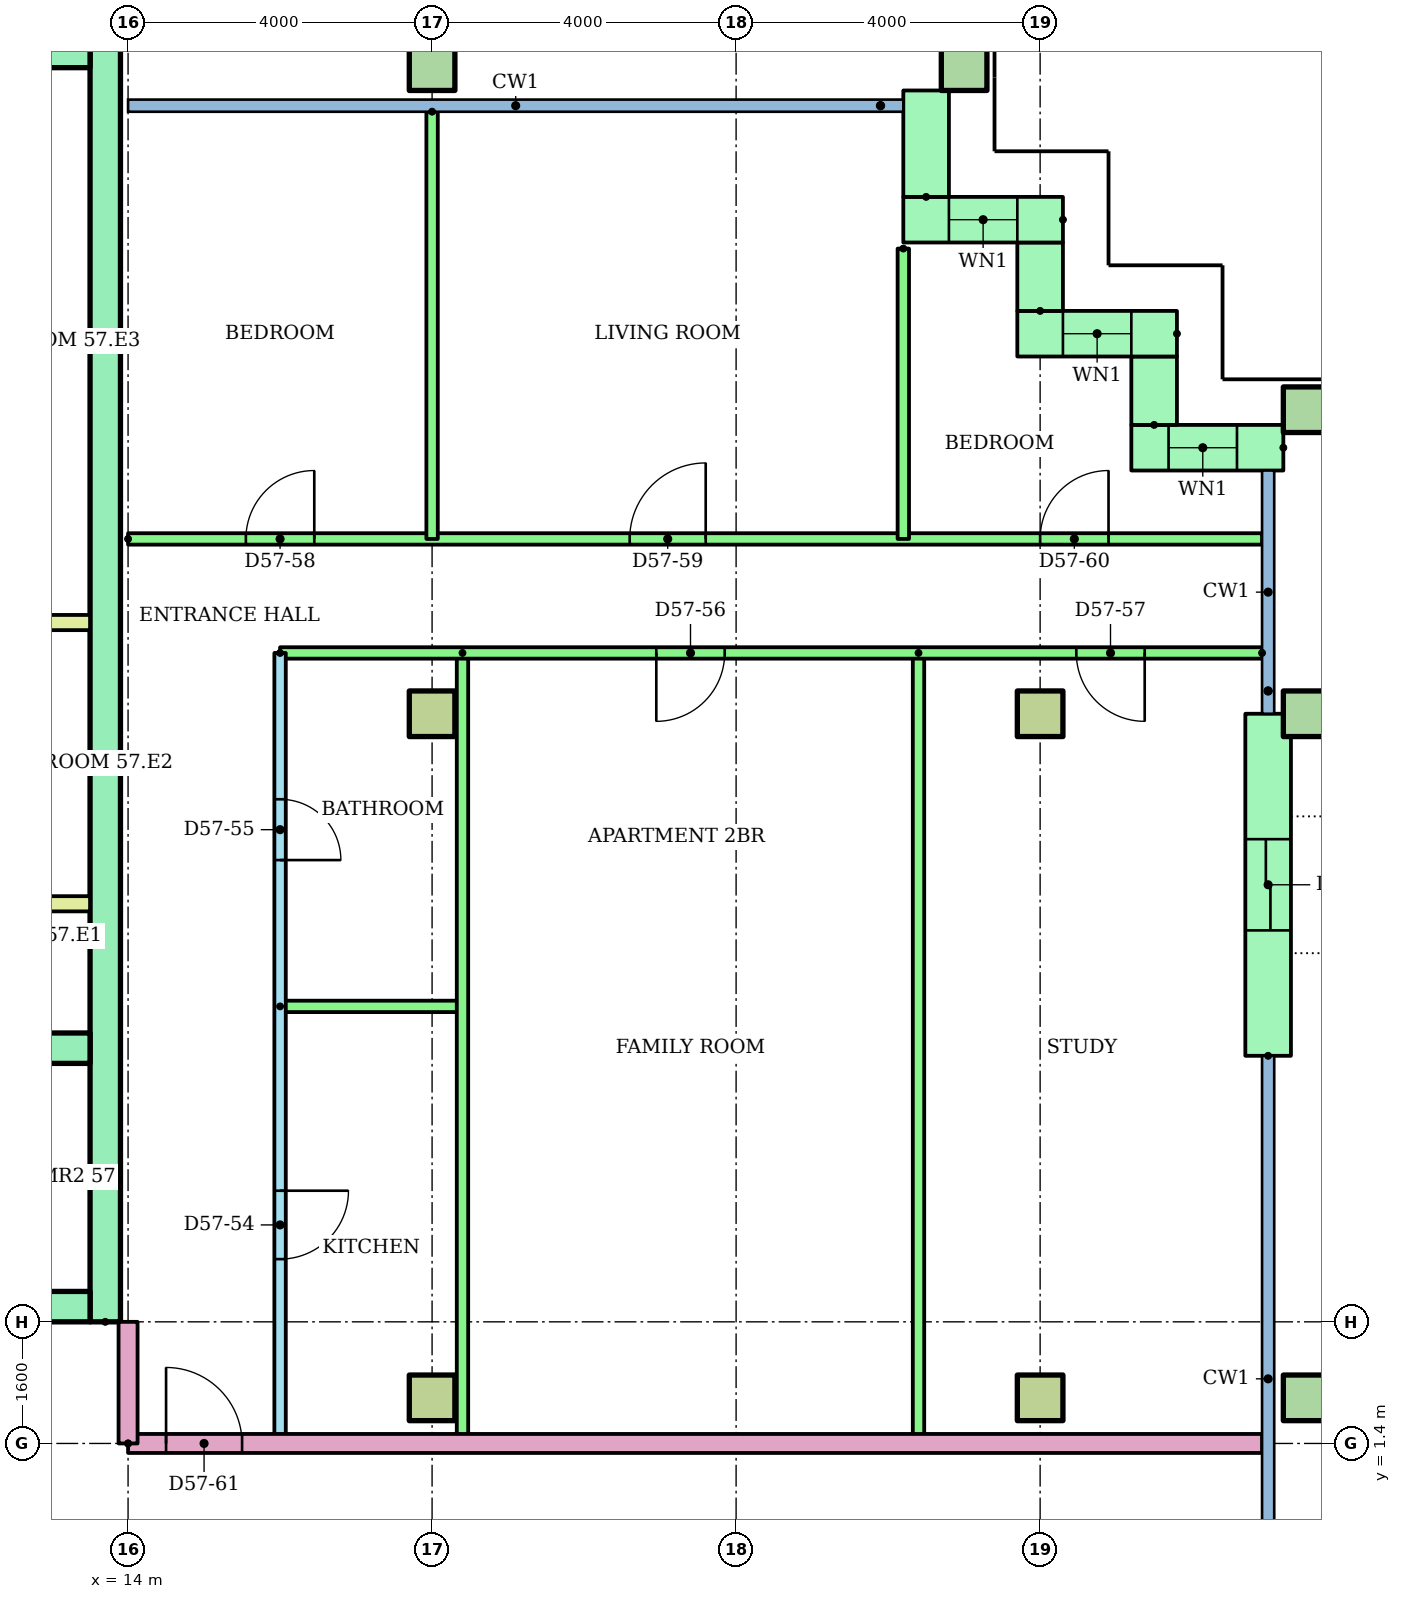
"""IFC4 building model, lengths in metres.
Left out: names, types, materials, properties, quantities, classifications, styles, units other than length and angle.
Written with IfcOpenShell. Run it as: python <this file> out.ifc"""

import sys

from ifc_helpers import new_model, si_unit, direction, frame, frame_2d, origin, origin_2d, place, context, subcontext, project, spatial, rectangle, hollow_rectangle, extrude, element, fill, save


model = new_model("IFC4")
c1 = context("Model", 3, precision=1e-05, world=origin(), true_north=direction((0.0, 1.0)))
c2 = subcontext(c1, "Body", "Model", "MODEL_VIEW")
j1 = project(units=[si_unit("LENGTHUNIT", "METRE"), si_unit("PLANEANGLEUNIT", "RADIAN")], contexts=[c1])
p1 = place(None, origin())
s1 = spatial("IfcSite", under=j1, at=p1, CompositionType="ELEMENT")
p2 = place(p1, origin())
s2 = spatial("IfcBuilding", under=s1, at=p2, CompositionType="ELEMENT")
p3 = place(p2, frame((0.0, 0.0, 220.4)))
s3 = spatial("IfcBuildingStorey", under=s2, at=p3, CompositionType="ELEMENT", Elevation=220.4)
for number, where in (
    (1, (18.0, 2.0, 0.0)),
    (2, (26.0, 2.0, 0.0)),
):
    element("IfcColumn", number, at=place(p3, frame(where)), inside=s3, PredefinedType="COLUMN", context=c2, shape_type="SweptSolid", body=[
        extrude(rectangle(XDim=0.6, YDim=0.6, at=origin_2d()), origin(), (0.0, 0.0, 1.0), 3.2),
    ])
p4 = place(p3, frame((29.5, 2.0, 0.0)))
e3 = element("IfcColumn", 3, at=p4, inside=s3, PredefinedType="COLUMN", context=c2, shape_type="SweptSolid", body=[
    extrude(hollow_rectangle(XDim=0.6, YDim=0.6, WallThickness=0.03, at=origin_2d()), origin(), (0.0, 0.0, 1.0), 3.2),
])
for number, where in (
    (4, (18.0, 11.0, 0.0)),
    (5, (26.0, 11.0, 0.0)),
):
    element("IfcColumn", number, at=place(p3, frame(where)), inside=s3, PredefinedType="COLUMN", context=c2, shape_type="SweptSolid", body=[
        extrude(rectangle(XDim=0.6, YDim=0.6, at=origin_2d()), origin(), (0.0, 0.0, 1.0), 3.2),
    ])
for number, where in (
    (6, (29.5, 11.0, 0.0)),
    (7, (29.5, 15.0, 0.0)),
    (8, (18.0, 19.5, 0.0)),
    (9, (25.0, 19.5, 0.0)),
):
    element("IfcColumn", number, at=place(p3, frame(where)), inside=s3, PredefinedType="COLUMN", context=c2, shape_type="SweptSolid", body=[
        extrude(hollow_rectangle(XDim=0.6, YDim=0.6, WallThickness=0.03, at=origin_2d()), origin(), (0.0, 0.0, 1.0), 3.2),
    ])
p5 = place(p3, frame((29.2, 14.5, 0.0), z_axis=(0.0, 0.0, 1.0), x_axis=(-1.0, 0.0, 0.0)))
e10 = element("IfcWall", 10, at=p5, inside=s3, PredefinedType="STANDARD", context=c2, shape_type="SweptSolid", body=[
    extrude(rectangle(XDim=2.0, YDim=0.6, at=frame_2d((1.0, 0.0))), origin(), (0.0, 0.0, 1.0), 2.92),
])
p6 = place(p5, frame((0.61, 0.0, 0.9)))
e11 = element("IfcOpeningElement", 11, at=p6, cuts=e10, PredefinedType="OPENING", context=c2, shape_type="SweptSolid", body=[
    extrude(rectangle(XDim=0.9, YDim=1.5, at=frame_2d((0.45, 0.75))), frame((0.0, 0.31, 0.0), z_axis=(0.0, -1.0, 0.0), x_axis=(1.0, 0.0, 0.0)), (0.0, 0.0, 1.0), 0.62),
])
p7 = place(p3, frame((27.5, 14.8, 0.0), z_axis=(0.0, 0.0, 1.0), x_axis=(0.0, 1.0, 0.0)))
e12 = element("IfcWall", 12, at=p7, inside=s3, PredefinedType="STANDARD", context=c2, shape_type="SweptSolid", body=[
    extrude(rectangle(XDim=0.9, YDim=0.6, at=frame_2d((0.45, 0.0))), origin(), (0.0, 0.0, 1.0), 2.92),
])
p8 = place(p3, frame((27.8, 16.0, 0.0), z_axis=(0.0, 0.0, 1.0), x_axis=(-1.0, 0.0, 0.0)))
e13 = element("IfcWall", 13, at=p8, inside=s3, PredefinedType="STANDARD", context=c2, shape_type="SweptSolid", body=[
    extrude(rectangle(XDim=2.1, YDim=0.6, at=frame_2d((1.05, 0.0))), origin(), (0.0, 0.0, 1.0), 2.92),
])
p9 = place(p8, frame((0.6, 0.0, 0.9)))
e14 = element("IfcOpeningElement", 14, at=p9, cuts=e13, PredefinedType="OPENING", context=c2, shape_type="SweptSolid", body=[
    extrude(rectangle(XDim=0.9, YDim=1.5, at=frame_2d((0.45, 0.75))), frame((0.0, 0.31, 0.0), z_axis=(0.0, -1.0, 0.0), x_axis=(1.0, 0.0, 0.0)), (0.0, 0.0, 1.0), 0.62),
])
p10 = place(p3, frame((26.0, 16.3, 0.0), z_axis=(0.0, 0.0, 1.0), x_axis=(0.0, 1.0, 0.0)))
e15 = element("IfcWall", 15, at=p10, inside=s3, PredefinedType="STANDARD", context=c2, shape_type="SweptSolid", body=[
    extrude(rectangle(XDim=0.9, YDim=0.6, at=frame_2d((0.45, 0.0))), origin(), (0.0, 0.0, 1.0), 2.92),
])
p11 = place(p3, frame((26.3, 17.5, 0.0), z_axis=(0.0, 0.0, 1.0), x_axis=(-1.0, 0.0, 0.0)))
e16 = element("IfcWall", 16, at=p11, inside=s3, PredefinedType="STANDARD", context=c2, shape_type="SweptSolid", body=[
    extrude(rectangle(XDim=2.1, YDim=0.6, at=frame_2d((1.05, 0.0))), origin(), (0.0, 0.0, 1.0), 2.92),
])
p12 = place(p11, frame((0.6, 0.0, 0.9)))
e17 = element("IfcOpeningElement", 17, at=p12, cuts=e16, PredefinedType="OPENING", context=c2, shape_type="SweptSolid", body=[
    extrude(rectangle(XDim=0.9, YDim=1.5, at=frame_2d((0.45, 0.75))), frame((0.0, 0.31, 0.0), z_axis=(0.0, -1.0, 0.0), x_axis=(1.0, 0.0, 0.0)), (0.0, 0.0, 1.0), 0.62),
])
p13 = place(p3, frame((24.5, 17.8, 0.0), z_axis=(0.0, 0.0, 1.0), x_axis=(0.0, 1.0, 0.0)))
e18 = element("IfcWall", 18, at=p13, inside=s3, PredefinedType="STANDARD", context=c2, shape_type="SweptSolid", body=[
    extrude(rectangle(XDim=1.4, YDim=0.6, at=frame_2d((0.7, 0.0))), origin(), (0.0, 0.0, 1.0), 2.92),
])
p14 = place(p3, frame((29.0, 6.5, 0.0), z_axis=(0.0, 0.0, 1.0), x_axis=(0.0, 1.0, 0.0)))
e19 = element("IfcWall", 19, at=p14, inside=s3, PredefinedType="STANDARD", context=c2, shape_type="SweptSolid", body=[
    extrude(rectangle(XDim=4.5, YDim=0.6, at=frame_2d((2.25, 0.0))), origin(), (0.0, 0.0, 1.0), 2.92),
])
p15 = place(p14, frame((1.65, 0.0, 0.0)))
e20 = element("IfcOpeningElement", 20, at=p15, cuts=e19, PredefinedType="OPENING", context=c2, shape_type="SweptSolid", body=[
    extrude(rectangle(XDim=1.2, YDim=2.1, at=frame_2d((0.6, 1.05))), frame((0.0, 0.31, 0.0), z_axis=(0.0, -1.0, 0.0), x_axis=(1.0, 0.0, 0.0)), (0.0, 0.0, 1.0), 0.62),
])
p16 = place(p3, frame((13.7, 3.0, 0.0), z_axis=(0.0, 0.0, 1.0), x_axis=(0.0, 1.0, 0.0)))
e21 = element("IfcWall", 21, at=p16, inside=s3, PredefinedType="SHEAR", context=c2, shape_type="SweptSolid", body=[
    extrude(rectangle(XDim=17.0, YDim=0.4, at=frame_2d((8.5, 0.0))), origin(), (0.0, 0.0, 1.0), 2.92),
])
p17 = place(p3, frame((-13.5, 19.7, 0.0)))
e22 = element("IfcWall", 22, at=p17, inside=s3, PredefinedType="SHEAR", context=c2, shape_type="SweptSolid", body=[
    extrude(rectangle(XDim=27.0, YDim=0.4, at=frame_2d((13.5, 0.0))), origin(), (0.0, 0.0, 1.0), 2.92),
])
p18 = place(p3, frame((-13.5, 3.2, 0.0)))
e23 = element("IfcWall", 23, at=p18, inside=s3, PredefinedType="SHEAR", context=c2, shape_type="SweptSolid", body=[
    extrude(rectangle(XDim=27.0, YDim=0.4, at=frame_2d((13.5, 0.0))), origin(), (0.0, 0.0, 1.0), 2.92),
])
p19 = place(p18, frame((22.083, 0.0, 0.0)))
e24 = element("IfcOpeningElement", 24, at=p19, cuts=e23, PredefinedType="OPENING", context=c2, shape_type="SweptSolid", body=[
    extrude(rectangle(XDim=1.1, YDim=2.1, at=frame_2d((0.55, 1.05))), frame((0.0, 0.21, 0.0), z_axis=(0.0, -1.0, 0.0), x_axis=(1.0, 0.0, 0.0)), (0.0, 0.0, 1.0), 0.42),
])
p20 = place(p18, frame((25.128, 0.0, 0.0)))
e25 = element("IfcOpeningElement", 25, at=p20, cuts=e23, PredefinedType="OPENING", context=c2, shape_type="SweptSolid", body=[
    extrude(rectangle(XDim=1.1, YDim=2.1, at=frame_2d((0.55, 1.05))), frame((0.0, 0.21, 0.0), z_axis=(0.0, -1.0, 0.0), x_axis=(1.0, 0.0, 0.0)), (0.0, 0.0, 1.0), 0.42),
])
p21 = place(p18, frame((12.6, 0.0, 0.0)))
e26 = element("IfcOpeningElement", 26, at=p21, cuts=e23, PredefinedType="OPENING", context=c2, shape_type="SweptSolid", body=[
    extrude(rectangle(XDim=1.8, YDim=2.1, at=frame_2d((0.9, 1.05))), frame((0.0, 0.21, 0.0), z_axis=(0.0, -1.0, 0.0), x_axis=(1.0, 0.0, 0.0)), (0.0, 0.0, 1.0), 0.42),
])
p22 = place(p3, frame((1.522, 6.6, 0.0)))
e27 = element("IfcWall", 27, at=p22, inside=s3, PredefinedType="SHEAR", context=c2, shape_type="SweptSolid", body=[
    extrude(rectangle(XDim=11.978, YDim=0.4, at=frame_2d((5.989, 0.0))), origin(), (0.0, 0.0, 1.0), 2.92),
])
p23 = place(p22, frame((1.022, 0.0, 0.0)))
e28 = element("IfcOpeningElement", 28, at=p23, cuts=e27, PredefinedType="OPENING", context=c2, shape_type="SweptSolid", body=[
    extrude(rectangle(XDim=1.0, YDim=2.1, at=frame_2d((0.5, 1.05))), frame((0.0, 0.21, 0.0), z_axis=(0.0, -1.0, 0.0), x_axis=(1.0, 0.0, 0.0)), (0.0, 0.0, 1.0), 0.42),
])
p24 = place(p22, frame((4.067, 0.0, 0.0)))
e29 = element("IfcOpeningElement", 29, at=p24, cuts=e27, PredefinedType="OPENING", context=c2, shape_type="SweptSolid", body=[
    extrude(rectangle(XDim=1.0, YDim=2.1, at=frame_2d((0.5, 1.05))), frame((0.0, 0.21, 0.0), z_axis=(0.0, -1.0, 0.0), x_axis=(1.0, 0.0, 0.0)), (0.0, 0.0, 1.0), 0.42),
])
for number, where in (
    (30, (9.6, 8.5, 0.0)),
    (31, (9.6, 12.2, 0.0)),
):
    element("IfcWall", number, at=place(p3, frame(where)), inside=s3, PredefinedType="PARTITIONING", context=c2, shape_type="SweptSolid", body=[
        extrude(rectangle(XDim=3.9, YDim=0.2, at=frame_2d((1.95, 0.0))), origin(), (0.0, 0.0, 1.0), 2.92),
    ])
p25 = place(p3, frame((16.0, 11.8, 0.0), z_axis=(0.0, 0.0, 1.0), x_axis=(0.0, -1.0, 0.0)))
e32 = element("IfcWall", 32, at=p25, inside=s3, PredefinedType="PARTITIONING", context=c2, shape_type="SweptSolid", body=[
    extrude(rectangle(XDim=10.4, YDim=0.15, at=frame_2d((5.2, 0.0))), origin(), (0.0, 0.0, 1.0), 2.4),
])
p26 = place(p25, frame((7.075, 0.0, 0.0)))
e33 = element("IfcOpeningElement", 33, at=p26, cuts=e32, PredefinedType="OPENING", context=c2, shape_type="SweptSolid", body=[
    extrude(rectangle(XDim=0.9, YDim=2.1, at=frame_2d((0.45, 1.05))), frame((0.0, 0.085, 0.0), z_axis=(0.0, -1.0, 0.0), x_axis=(1.0, 0.0, 0.0)), (0.0, 0.0, 1.0), 0.17),
])
p27 = place(p25, frame((1.925, 0.0, 0.0)))
e34 = element("IfcOpeningElement", 34, at=p27, cuts=e32, PredefinedType="OPENING", context=c2, shape_type="SweptSolid", body=[
    extrude(rectangle(XDim=0.8, YDim=2.1, at=frame_2d((0.4, 1.05))), frame((0.0, 0.085, 0.0), z_axis=(0.0, -1.0, 0.0), x_axis=(1.0, 0.0, 0.0)), (0.0, 0.0, 1.0), 0.17),
])
p28 = place(p3, frame((16.0, 7.15, 0.0)))
e35 = element("IfcWall", 35, at=p28, inside=s3, PredefinedType="PARTITIONING", context=c2, shape_type="SweptSolid", body=[
    extrude(rectangle(XDim=2.4, YDim=0.15, at=frame_2d((1.2, 0.0))), origin(), (0.0, 0.0, 1.0), 2.4),
])
for number, where, z_axis, x_axis in (
    (36, (18.4, 11.8, 0.0), (0.0, 0.0, 1.0), (0.0, -1.0, 0.0)),
    (37, (24.4, 11.8, 0.0), (0.0, 0.0, 1.0), (0.0, -1.0, 0.0)),
):
    element("IfcWall", number, at=place(p3, frame(where, z_axis=z_axis, x_axis=x_axis)), inside=s3, PredefinedType="PARTITIONING", context=c2, shape_type="SweptSolid", body=[
        extrude(rectangle(XDim=10.4, YDim=0.15, at=frame_2d((5.2, 0.0))), origin(), (0.0, 0.0, 1.0), 2.4),
    ])
p29 = place(p3, frame((28.92, 11.8, 0.0), z_axis=(0.0, 0.0, 1.0), x_axis=(-1.0, 0.0, 0.0)))
e38 = element("IfcWall", 38, at=p29, inside=s3, PredefinedType="PARTITIONING", context=c2, shape_type="SweptSolid", body=[
    extrude(rectangle(XDim=12.92, YDim=0.15, at=frame_2d((6.46, 0.0))), origin(), (0.0, 0.0, 1.0), 2.4),
])
p30 = place(p29, frame((7.07, 0.0, 0.0)))
e39 = element("IfcOpeningElement", 39, at=p30, cuts=e38, PredefinedType="OPENING", context=c2, shape_type="SweptSolid", body=[
    extrude(rectangle(XDim=0.9, YDim=2.1, at=frame_2d((0.45, 1.05))), frame((0.0, 0.085, 0.0), z_axis=(0.0, -1.0, 0.0), x_axis=(1.0, 0.0, 0.0)), (0.0, 0.0, 1.0), 0.17),
])
p31 = place(p29, frame((1.544, 0.0, 0.0)))
e40 = element("IfcOpeningElement", 40, at=p31, cuts=e38, PredefinedType="OPENING", context=c2, shape_type="SweptSolid", body=[
    extrude(rectangle(XDim=0.9, YDim=2.1, at=frame_2d((0.45, 1.05))), frame((0.0, 0.085, 0.0), z_axis=(0.0, -1.0, 0.0), x_axis=(1.0, 0.0, 0.0)), (0.0, 0.0, 1.0), 0.17),
])
p32 = place(p3, frame((14.0, 13.3, 0.0)))
e41 = element("IfcWall", 41, at=p32, inside=s3, PredefinedType="PARTITIONING", context=c2, shape_type="SweptSolid", body=[
    extrude(rectangle(XDim=14.92, YDim=0.15, at=frame_2d((7.46, 0.0))), origin(), (0.0, 0.0, 1.0), 2.4),
])
p33 = place(p32, frame((1.55, 0.0, 0.0)))
e42 = element("IfcOpeningElement", 42, at=p33, cuts=e41, PredefinedType="OPENING", context=c2, shape_type="SweptSolid", body=[
    extrude(rectangle(XDim=0.9, YDim=2.1, at=frame_2d((0.45, 1.05))), frame((0.0, 0.085, 0.0), z_axis=(0.0, -1.0, 0.0), x_axis=(1.0, 0.0, 0.0)), (0.0, 0.0, 1.0), 0.17),
])
p34 = place(p32, frame((6.6, 0.0, 0.0)))
e43 = element("IfcOpeningElement", 43, at=p34, cuts=e41, PredefinedType="OPENING", context=c2, shape_type="SweptSolid", body=[
    extrude(rectangle(XDim=1.0, YDim=2.1, at=frame_2d((0.5, 1.05))), frame((0.0, 0.085, 0.0), z_axis=(0.0, -1.0, 0.0), x_axis=(1.0, 0.0, 0.0)), (0.0, 0.0, 1.0), 0.17),
])
p35 = place(p32, frame((12.0, 0.0, 0.0)))
e44 = element("IfcOpeningElement", 44, at=p35, cuts=e41, PredefinedType="OPENING", context=c2, shape_type="SweptSolid", body=[
    extrude(rectangle(XDim=0.9, YDim=2.1, at=frame_2d((0.45, 1.05))), frame((0.0, 0.085, 0.0), z_axis=(0.0, -1.0, 0.0), x_axis=(1.0, 0.0, 0.0)), (0.0, 0.0, 1.0), 0.17),
])
p36 = place(p3, frame((18.0, 18.921, 0.0), z_axis=(0.0, 0.0, 1.0), x_axis=(0.0, -1.0, 0.0)))
e45 = element("IfcWall", 45, at=p36, inside=s3, PredefinedType="PARTITIONING", context=c2, shape_type="SweptSolid", body=[
    extrude(rectangle(XDim=5.621, YDim=0.15, at=frame_2d((2.811, 0.0))), origin(), (0.0, 0.0, 1.0), 2.4),
])
p37 = place(p3, frame((24.2, 17.12, 0.0), z_axis=(0.0, 0.0, 1.0), x_axis=(0.0, -1.0, 0.0)))
e46 = element("IfcWall", 46, at=p37, inside=s3, PredefinedType="PARTITIONING", context=c2, shape_type="SweptSolid", body=[
    extrude(rectangle(XDim=3.82, YDim=0.15, at=frame_2d((1.91, 0.0))), origin(), (0.0, 0.0, 1.0), 2.4),
])
p38 = place(p3, frame((14.0, 1.4, 0.0)))
e47 = element("IfcWall", 47, at=p38, inside=s3, PredefinedType="PARTITIONING", context=c2, shape_type="SweptSolid", body=[
    extrude(rectangle(XDim=14.92, YDim=0.25, at=frame_2d((7.46, 0.0))), origin(), (0.0, 0.0, 1.0), 2.4),
])
p39 = place(p38, frame((0.5, 0.0, 0.0)))
e48 = element("IfcOpeningElement", 48, at=p39, cuts=e47, PredefinedType="OPENING", context=c2, shape_type="SweptSolid", body=[
    extrude(rectangle(XDim=1.0, YDim=2.1, at=frame_2d((0.5, 1.05))), frame((0.0, 0.135, 0.0), z_axis=(0.0, -1.0, 0.0), x_axis=(1.0, 0.0, 0.0)), (0.0, 0.0, 1.0), 0.27),
])
p40 = place(p3, frame((14.0, 1.4, 0.0), z_axis=(0.0, 0.0, 1.0), x_axis=(0.0, 1.0, 0.0)))
e49 = element("IfcWall", 49, at=p40, inside=s3, PredefinedType="PARTITIONING", context=c2, shape_type="SweptSolid", body=[
    extrude(rectangle(XDim=1.6, YDim=0.25, at=frame_2d((0.8, 0.0))), origin(), (0.0, 0.0, 1.0), 2.4),
])
p41 = place(p6, origin())
e50 = element("IfcWindow", 50, at=p41, inside=s3, PartitioningType="SINGLE_PANEL", PredefinedType="WINDOW", context=c2, shape_type="SweptSolid", body=[
    extrude(rectangle(XDim=0.9, YDim=1.5, at=frame_2d((0.45, 0.75))), frame((0.0, 0.03, 0.0), z_axis=(0.0, -1.0, 0.0), x_axis=(1.0, 0.0, 0.0)), (0.0, 0.0, 1.0), 0.06),
])
fill(e11, e50)
p42 = place(p9, origin())
e51 = element("IfcWindow", 51, at=p42, inside=s3, PartitioningType="SINGLE_PANEL", PredefinedType="WINDOW", context=c2, shape_type="SweptSolid", body=[
    extrude(rectangle(XDim=0.9, YDim=1.5, at=frame_2d((0.45, 0.75))), frame((0.0, 0.03, 0.0), z_axis=(0.0, -1.0, 0.0), x_axis=(1.0, 0.0, 0.0)), (0.0, 0.0, 1.0), 0.06),
])
fill(e14, e51)
p43 = place(p12, origin())
e52 = element("IfcWindow", 52, at=p43, inside=s3, PartitioningType="SINGLE_PANEL", PredefinedType="WINDOW", context=c2, shape_type="SweptSolid", body=[
    extrude(rectangle(XDim=0.9, YDim=1.5, at=frame_2d((0.45, 0.75))), frame((0.0, 0.03, 0.0), z_axis=(0.0, -1.0, 0.0), x_axis=(1.0, 0.0, 0.0)), (0.0, 0.0, 1.0), 0.06),
])
fill(e17, e52)
p44 = place(p26, origin())
e53 = element("IfcDoor", 53, at=p44, inside=s3, OperationType="SINGLE_SWING_LEFT", PredefinedType="DOOR", context=c2, shape_type="SweptSolid", body=[
    extrude(rectangle(XDim=0.9, YDim=2.1, at=frame_2d((0.45, 1.05))), frame((0.0, 0.025, 0.0), z_axis=(0.0, -1.0, 0.0), x_axis=(1.0, 0.0, 0.0)), (0.0, 0.0, 1.0), 0.05),
])
fill(e33, e53)
p45 = place(p27, origin())
e54 = element("IfcDoor", 54, at=p45, inside=s3, OperationType="SINGLE_SWING_RIGHT", PredefinedType="DOOR", context=c2, shape_type="SweptSolid", body=[
    extrude(rectangle(XDim=0.8, YDim=2.1, at=frame_2d((0.4, 1.05))), frame((0.0, 0.025, 0.0), z_axis=(0.0, -1.0, 0.0), x_axis=(1.0, 0.0, 0.0)), (0.0, 0.0, 1.0), 0.05),
])
fill(e34, e54)
p46 = place(p30, origin())
e55 = element("IfcDoor", 55, at=p46, inside=s3, OperationType="SINGLE_SWING_RIGHT", PredefinedType="DOOR", context=c2, shape_type="SweptSolid", body=[
    extrude(rectangle(XDim=0.9, YDim=2.1, at=frame_2d((0.45, 1.05))), frame((0.0, 0.025, 0.0), z_axis=(0.0, -1.0, 0.0), x_axis=(1.0, 0.0, 0.0)), (0.0, 0.0, 1.0), 0.05),
])
fill(e39, e55)
p47 = place(p31, origin())
e56 = element("IfcDoor", 56, at=p47, inside=s3, OperationType="SINGLE_SWING_LEFT", PredefinedType="DOOR", context=c2, shape_type="SweptSolid", body=[
    extrude(rectangle(XDim=0.9, YDim=2.1, at=frame_2d((0.45, 1.05))), frame((0.0, 0.025, 0.0), z_axis=(0.0, -1.0, 0.0), x_axis=(1.0, 0.0, 0.0)), (0.0, 0.0, 1.0), 0.05),
])
fill(e40, e56)
p48 = place(p33, origin())
e57 = element("IfcDoor", 57, at=p48, inside=s3, OperationType="SINGLE_SWING_RIGHT", PredefinedType="DOOR", context=c2, shape_type="SweptSolid", body=[
    extrude(rectangle(XDim=0.9, YDim=2.1, at=frame_2d((0.45, 1.05))), frame((0.0, 0.025, 0.0), z_axis=(0.0, -1.0, 0.0), x_axis=(1.0, 0.0, 0.0)), (0.0, 0.0, 1.0), 0.05),
])
fill(e42, e57)
p49 = place(p34, origin())
e58 = element("IfcDoor", 58, at=p49, inside=s3, OperationType="SINGLE_SWING_RIGHT", PredefinedType="DOOR", context=c2, shape_type="SweptSolid", body=[
    extrude(rectangle(XDim=1.0, YDim=2.1, at=frame_2d((0.5, 1.05))), frame((0.0, 0.025, 0.0), z_axis=(0.0, -1.0, 0.0), x_axis=(1.0, 0.0, 0.0)), (0.0, 0.0, 1.0), 0.05),
])
fill(e43, e58)
p50 = place(p35, origin())
e59 = element("IfcDoor", 59, at=p50, inside=s3, OperationType="SINGLE_SWING_RIGHT", PredefinedType="DOOR", context=c2, shape_type="SweptSolid", body=[
    extrude(rectangle(XDim=0.9, YDim=2.1, at=frame_2d((0.45, 1.05))), frame((0.0, 0.025, 0.0), z_axis=(0.0, -1.0, 0.0), x_axis=(1.0, 0.0, 0.0)), (0.0, 0.0, 1.0), 0.05),
])
fill(e44, e59)
p51 = place(p39, origin())
e60 = element("IfcDoor", 60, at=p51, inside=s3, OperationType="SINGLE_SWING_LEFT", PredefinedType="DOOR", context=c2, shape_type="SweptSolid", body=[
    extrude(rectangle(XDim=1.0, YDim=2.1, at=frame_2d((0.5, 1.05))), frame((0.0, 0.025, 0.0), z_axis=(0.0, -1.0, 0.0), x_axis=(1.0, 0.0, 0.0)), (0.0, 0.0, 1.0), 0.05),
])
fill(e48, e60)
p52 = place(p15, origin())
e61 = element("IfcDoor", 61, at=p52, inside=s3, OperationType="SLIDING_TO_LEFT", PredefinedType="DOOR", context=c2, shape_type="SweptSolid", body=[
    extrude(rectangle(XDim=1.2, YDim=2.1, at=frame_2d((0.6, 1.05))), frame((0.0, 0.025, 0.0), z_axis=(0.0, -1.0, 0.0), x_axis=(1.0, 0.0, 0.0)), (0.0, 0.0, 1.0), 0.05),
])
fill(e20, e61)
save(model, sys.argv[1])
